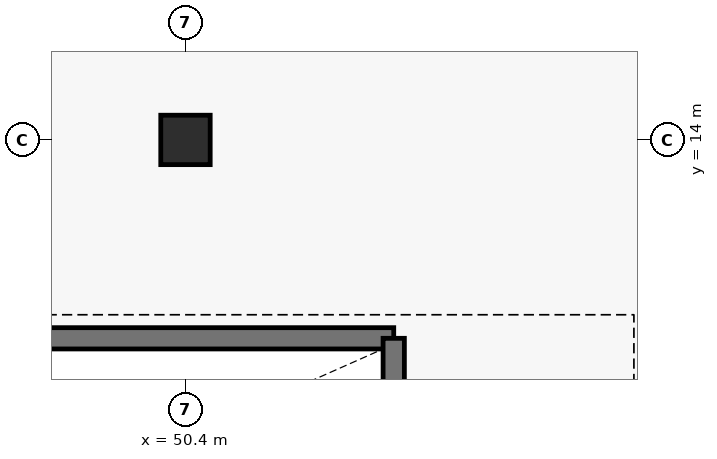
"""IFC4 building model, lengths in metres.
Left out: names, types, materials, properties, quantities, classifications, styles, units other than length and angle.
Written with IfcOpenShell. Run it as: python <this file> out.ifc"""

import sys

from ifc_helpers import new_model, si_unit, direction, frame, frame_2d, origin, origin_2d, place, context, subcontext, project, spatial, rectangle, extrude, element, save


model = new_model("IFC4")
c1 = context("Model", 3, precision=1e-05, world=origin(), true_north=direction((0.0, 1.0)))
c2 = subcontext(c1, "Body", "Model", "MODEL_VIEW")
j1 = project(units=[si_unit("LENGTHUNIT", "METRE"), si_unit("PLANEANGLEUNIT", "RADIAN")], contexts=[c1])
p1 = place(None, origin())
s1 = spatial("IfcSite", under=j1, at=p1, CompositionType="ELEMENT")
p2 = place(p1, origin())
s2 = spatial("IfcBuilding", under=s1, at=p2, CompositionType="ELEMENT")
p3 = place(p2, frame((0.0, 0.0, 13.12)))
s3 = spatial("IfcBuildingStorey", under=s2, at=p3, CompositionType="ELEMENT", Elevation=13.12)
p4 = place(p3, frame((50.4, 14.0, 0.0), z_axis=(0.0, 0.0, 1.0), x_axis=(1.0, 0.0, 0.0)))
e1 = element("IfcColumn", 1, at=p4, inside=s3, PredefinedType="COLUMN", context=c2, shape_type="SweptSolid", body=[
    extrude(rectangle(XDim=0.65, YDim=0.65, at=origin_2d()), origin(), (0.0, 0.0, 1.0), 3.2),
])
p5 = place(p3, frame((44.26, 11.39, 0.0), z_axis=(0.0, 0.0, 1.0), x_axis=(1.0, 0.0, 0.0)))
e2 = element("IfcWall", 2, at=p5, inside=s3, PredefinedType="SHEAR", context=c2, shape_type="SweptSolid", body=[
    extrude(rectangle(XDim=8.88, YDim=0.28, at=frame_2d((4.44, 0.0))), origin(), (0.0, 0.0, 1.0), 3.2),
])
p6 = place(p3, frame((53.14, 7.96, 0.0), z_axis=(0.0, 0.0, 1.0), x_axis=(0.0, 1.0, 0.0)))
e3 = element("IfcWall", 3, at=p6, inside=s3, PredefinedType="SHEAR", context=c2, shape_type="SweptSolid", body=[
    extrude(rectangle(XDim=3.43, YDim=0.28, at=frame_2d((1.715, 0.0))), origin(), (0.0, 0.0, 1.0), 3.2),
])
save(model, sys.argv[1])
